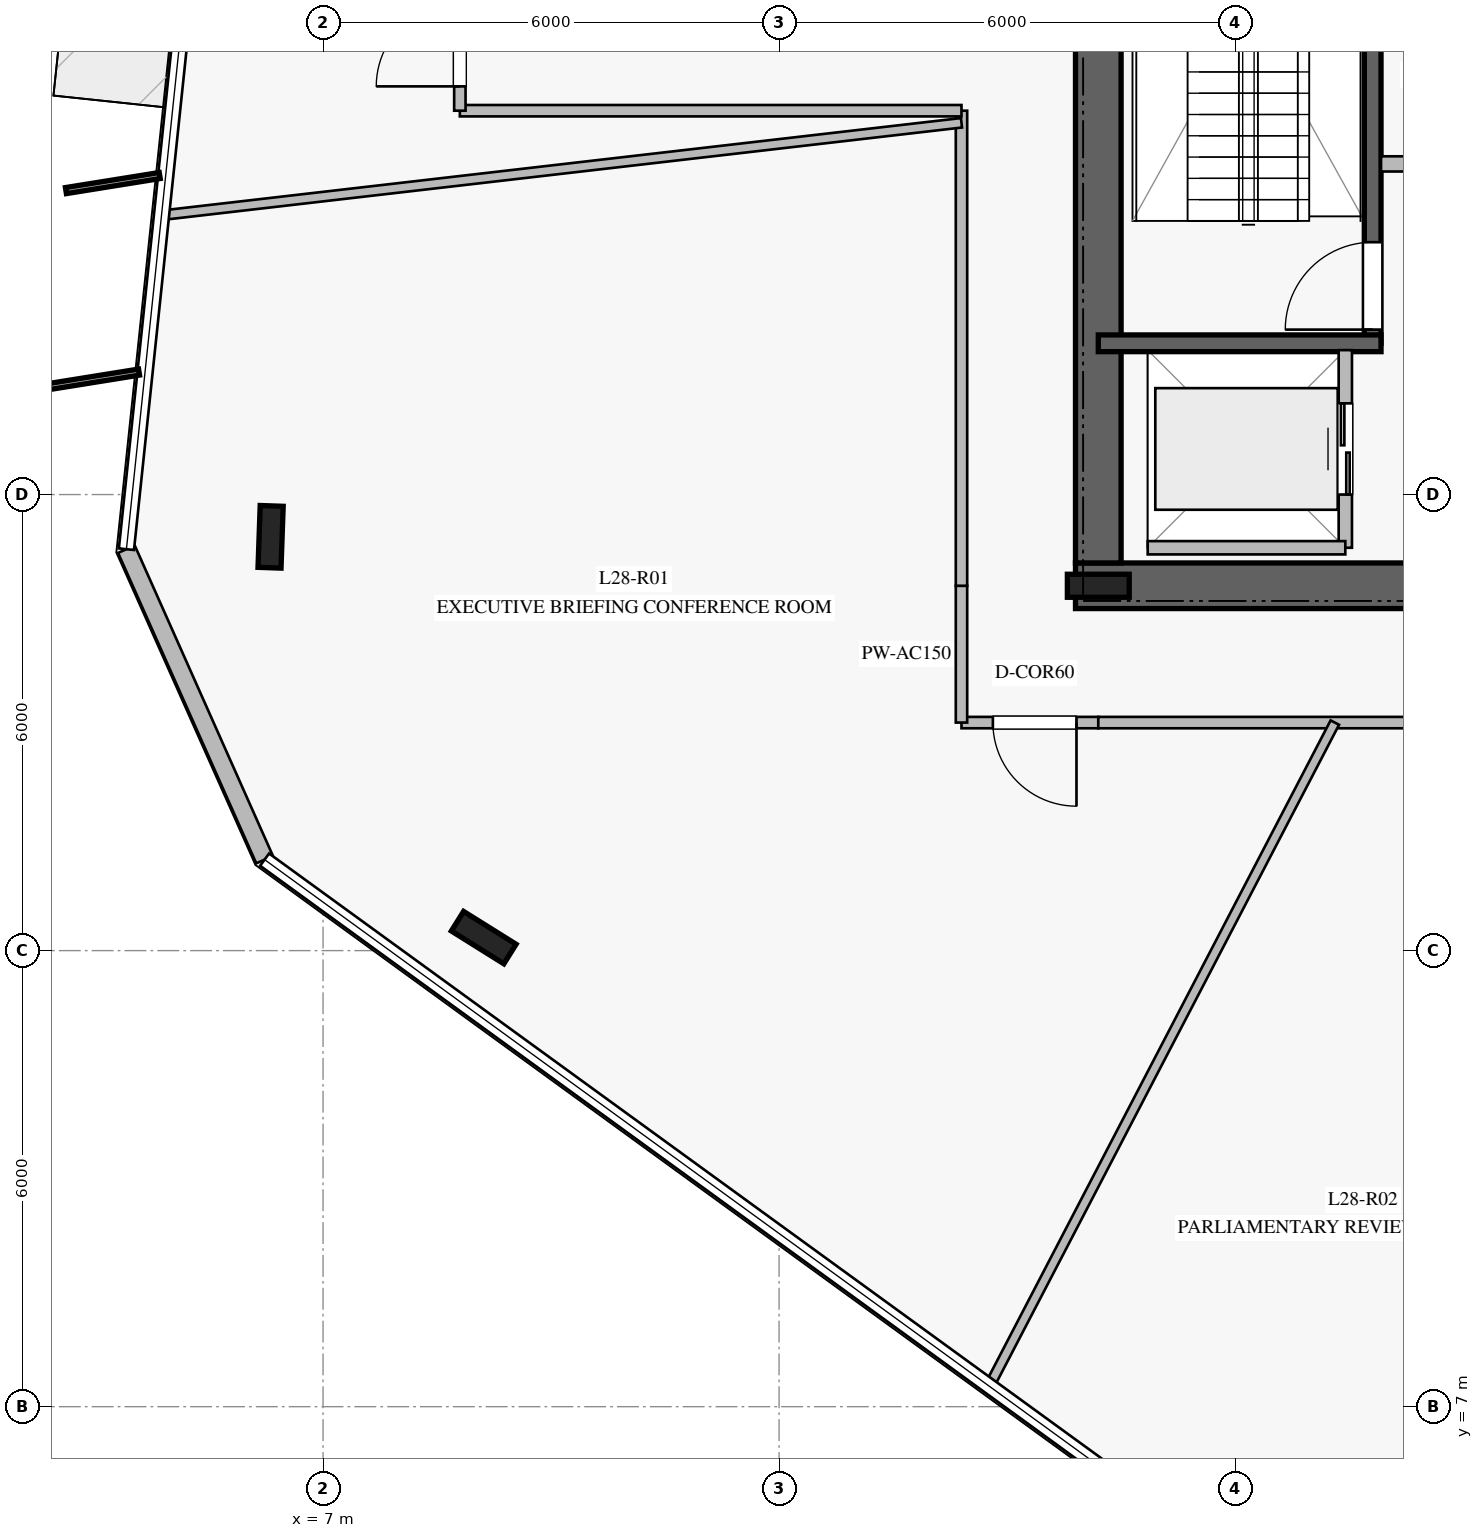
"""IFC4 building model, lengths in metres.
Left out: names, types, materials, properties, quantities, classifications, styles, units other than length and angle.
Written with IfcOpenShell. Run it as: python <this file> out.ifc"""

import sys

from ifc_helpers import new_model, si_unit, direction, frame, frame_2d, origin, origin_2d, place, context, subcontext, project, spatial, rectangle, i_section, extrude, element, fill, save


model = new_model("IFC4")
c1 = context("Model", 3, precision=1e-05, world=origin(), true_north=direction((0.0, 1.0)))
c2 = subcontext(c1, "Body", "Model", "MODEL_VIEW")
j1 = project(units=[si_unit("LENGTHUNIT", "METRE"), si_unit("PLANEANGLEUNIT", "RADIAN")], contexts=[c1])
p1 = place(None, origin())
s1 = spatial("IfcSite", under=j1, at=p1, CompositionType="ELEMENT")
p2 = place(p1, origin())
s2 = spatial("IfcBuilding", under=s1, at=p2, CompositionType="ELEMENT")
p3 = place(p2, frame((0.0, 0.0, 118.4)))
s3 = spatial("IfcBuildingStorey", under=s2, at=p3, CompositionType="ELEMENT", Elevation=118.4)
p4 = place(p3, frame((16.9, 17.8, 0.0), z_axis=(0.0, 0.0, 1.0), x_axis=(1.0, 0.0, 0.0)))
e1 = element("IfcWall", 1, at=p4, inside=s3, PredefinedType="SHEAR", context=c2, shape_type="SweptSolid", body=[
    extrude(rectangle(XDim=16.2, YDim=0.6, at=frame_2d((8.1, 0.0))), origin(), (0.0, 0.0, 1.0), 3.76),
])
p5 = place(p4, frame((5.05, 0.0, 0.0)))
e2 = element("IfcOpeningElement", 2, at=p5, cuts=e1, PredefinedType="OPENING", context=c2, shape_type="SweptSolid", body=[
    extrude(rectangle(XDim=1.2, YDim=2.25, at=frame_2d((0.6, 1.125))), frame((0.0, 0.31, 0.0), z_axis=(0.0, -1.0, 0.0), x_axis=(1.0, 0.0, 0.0)), (0.0, 0.0, 1.0), 0.62),
])
p6 = place(p4, frame((10.95, 0.0, 0.0)))
e3 = element("IfcOpeningElement", 3, at=p6, cuts=e1, PredefinedType="OPENING", context=c2, shape_type="SweptSolid", body=[
    extrude(rectangle(XDim=1.1, YDim=2.2, at=frame_2d((0.55, 1.1))), frame((0.0, 0.31, 0.0), z_axis=(0.0, -1.0, 0.0), x_axis=(1.0, 0.0, 0.0)), (0.0, 0.0, 1.0), 0.62),
])
p7 = place(p3, frame((17.2, 31.9, 0.0), z_axis=(0.0, 0.0, 1.0), x_axis=(0.0, -1.0, 0.0)))
e4 = element("IfcWall", 4, at=p7, inside=s3, PredefinedType="SHEAR", context=c2, shape_type="SweptSolid", body=[
    extrude(rectangle(XDim=13.8, YDim=0.6, at=frame_2d((6.9, 0.0))), origin(), (0.0, 0.0, 1.0), 3.76),
])
p8 = place(p7, frame((2.05, 0.0, 0.0)))
e5 = element("IfcOpeningElement", 5, at=p8, cuts=e4, PredefinedType="OPENING", context=c2, shape_type="SweptSolid", body=[
    extrude(rectangle(XDim=1.5, YDim=2.2, at=frame_2d((0.75, 1.1))), frame((0.0, 0.31, 0.0), z_axis=(0.0, -1.0, 0.0), x_axis=(1.0, 0.0, 0.0)), (0.0, 0.0, 1.0), 0.62),
])
p9 = place(p3, frame((17.2, 17.8, 0.0), z_axis=(0.0, 0.0, 1.0), x_axis=(1.0, 0.0, 0.0)))
e6 = element("IfcColumn", 6, at=p9, inside=s3, PredefinedType="COLUMN", context=c2, shape_type="SweptSolid", body=[
    extrude(i_section(OverallWidth=0.303, OverallDepth=0.814, WebThickness=0.021, FlangeThickness=0.04, at=origin_2d()), origin(), (0.0, 0.0, 1.0), 4.0),
])
p10 = place(p3, frame((20.81, 20.99, 0.0), z_axis=(0.0, 0.0, 1.0), x_axis=(0.0, 1.0, 0.0)))
e7 = element("IfcWall", 7, at=p10, inside=s3, PredefinedType="SOLIDWALL", context=c2, shape_type="SweptSolid", body=[
    extrude(rectangle(XDim=7.22, YDim=0.22, at=frame_2d((3.61, 0.0))), origin(), (0.0, 0.0, 1.0), 3.76),
])
p11 = place(p10, frame((0.18, 0.0, 0.0)))
e8 = element("IfcOpeningElement", 8, at=p11, cuts=e7, PredefinedType="OPENING", context=c2, shape_type="SweptSolid", body=[
    extrude(rectangle(XDim=1.15, YDim=2.2, at=frame_2d((0.575, 1.1))), frame((0.0, 0.12, 0.0), z_axis=(0.0, -1.0, 0.0), x_axis=(1.0, 0.0, 0.0)), (0.0, 0.0, 1.0), 0.24),
])
p12 = place(p3, frame((17.2, 20.99, 0.0), z_axis=(0.0, 0.0, 1.0), x_axis=(1.0, 0.0, 0.0)))
e9 = element("IfcWall", 9, at=p12, inside=s3, PredefinedType="SOLIDWALL", context=c2, shape_type="SweptSolid", body=[
    extrude(rectangle(XDim=3.72, YDim=0.22, at=frame_2d((1.86, 0.0))), origin(), (0.0, 0.0, 1.0), 3.76),
])
for number, where, z_axis, x_axis in (
    (10, (6.31, 18.444, 0.0), (0.0, 0.0, 1.0), (0.035, 0.999, 0.0)),
    (11, (9.114, 13.171, 0.0), (0.0, 0.0, 1.0), (-0.848, 0.53, 0.0)),
):
    element("IfcColumn", number, at=place(p3, frame(where, z_axis=z_axis, x_axis=x_axis)), inside=s3, PredefinedType="COLUMN", context=c2, shape_type="SweptSolid", body=[
        extrude(i_section(OverallWidth=0.303, OverallDepth=0.814, WebThickness=0.021, FlangeThickness=0.04, at=origin_2d()), origin(), (0.0, 0.0, 1.0), 4.0),
    ])
p13 = place(p3, frame((4.413, 18.281, 0.0), z_axis=(0.0, 0.0, 1.0), x_axis=(0.406655262741, -0.913581686159, 0.0)))
e12 = element("IfcWall", 12, at=p13, inside=s3, PredefinedType="STANDARD", context=c2, shape_type="SweptSolid", body=[
    extrude(rectangle(XDim=4.47, YDim=0.24, at=frame_2d((2.235, 0.0))), origin(), (0.0, 0.0, 1.0), 3.76),
])
p14 = place(p3, frame((20.92, 23.35, 0.0), z_axis=(0.0, 0.0, 1.0), x_axis=(1.0, 0.0, 0.0)))
e13 = element("IfcWall", 13, at=p14, inside=s3, PredefinedType="PARTITIONING", context=c2, shape_type="SweptSolid", body=[
    extrude(rectangle(XDim=3.38, YDim=0.2, at=frame_2d((1.69, 0.0))), origin(), (0.0, 0.0, 1.0), 3.76),
])
p15 = place(p3, frame((20.45, 18.3, 0.0), z_axis=(0.0, 0.0, 1.0), x_axis=(0.0, 1.0, 0.0)))
e14 = element("IfcWall", 14, at=p15, inside=s3, PredefinedType="PARTITIONING", context=c2, shape_type="SweptSolid", body=[
    extrude(rectangle(XDim=2.6, YDim=0.175, at=frame_2d((1.3, 0.0))), origin(), (0.0, 0.0, 1.0), 3.76),
])
p16 = place(p15, frame((0.7, 0.0, 0.0)))
e15 = element("IfcOpeningElement", 15, at=p16, cuts=e14, PredefinedType="OPENING", context=c2, shape_type="SweptSolid", body=[
    extrude(rectangle(XDim=1.2, YDim=2.2, at=frame_2d((0.6, 1.1))), frame((0.0, 0.098, 0.0), z_axis=(0.0, -1.0, 0.0), x_axis=(1.0, 0.0, 0.0)), (0.0, 0.0, 1.0), 0.195),
])
p17 = place(p3, frame((17.85, 18.3, 0.0), z_axis=(0.0, 0.0, 1.0), x_axis=(1.0, 0.0, 0.0)))
e16 = element("IfcWall", 16, at=p17, inside=s3, PredefinedType="PARTITIONING", context=c2, shape_type="SweptSolid", body=[
    extrude(rectangle(XDim=2.6, YDim=0.175, at=frame_2d((1.3, 0.0))), origin(), (0.0, 0.0, 1.0), 3.76),
])
p18 = place(p3, frame((17.2, 16.0, 0.0), z_axis=(0.0, 0.0, 1.0), x_axis=(-1.0, 0.0, 0.0)))
e17 = element("IfcWall", 17, at=p18, inside=s3, PredefinedType="PARTITIONING", context=c2, shape_type="SweptSolid", body=[
    extrude(rectangle(XDim=1.8, YDim=0.15, at=frame_2d((0.9, 0.0))), origin(), (0.0, 0.0, 1.0), 3.36),
])
p19 = place(p18, frame((0.287, 0.0, 0.0)))
e18 = element("IfcOpeningElement", 18, at=p19, cuts=e17, PredefinedType="OPENING", context=c2, shape_type="SweptSolid", body=[
    extrude(rectangle(XDim=1.1, YDim=2.2, at=frame_2d((0.55, 1.1))), frame((0.0, 0.085, 0.0), z_axis=(0.0, -1.0, 0.0), x_axis=(1.0, 0.0, 0.0)), (0.0, 0.0, 1.0), 0.17),
])
p20 = place(p3, frame((15.4, 16.0, 0.0), z_axis=(0.0, 0.0, 1.0), x_axis=(0.0, 1.0, 0.0)))
e19 = element("IfcWall", 19, at=p20, inside=s3, PredefinedType="PARTITIONING", context=c2, shape_type="SweptSolid", body=[
    extrude(rectangle(XDim=1.8, YDim=0.15, at=frame_2d((0.9, 0.0))), origin(), (0.0, 0.0, 1.0), 3.21),
])
p21 = place(p3, frame((15.4, 17.8, 0.0), z_axis=(0.0, 0.0, 1.0), x_axis=(0.0, 1.0, 0.0)))
e20 = element("IfcWall", 20, at=p21, inside=s3, PredefinedType="PARTITIONING", context=c2, shape_type="SweptSolid", body=[
    extrude(rectangle(XDim=6.25, YDim=0.15, at=frame_2d((3.125, 0.0))), origin(), (0.0, 0.0, 1.0), 3.21),
])
p22 = place(p3, frame((15.4, 24.05, 0.0), z_axis=(0.0, 0.0, 1.0), x_axis=(-1.0, 0.0, 0.0)))
e21 = element("IfcWall", 21, at=p22, inside=s3, PredefinedType="PARTITIONING", context=c2, shape_type="SweptSolid", body=[
    extrude(rectangle(XDim=6.6, YDim=0.15, at=frame_2d((3.3, 0.0))), origin(), (0.0, 0.0, 1.0), 3.36),
])
p23 = place(p3, frame((8.8, 24.05, 0.0), z_axis=(0.0, 0.0, 1.0), x_axis=(0.0, 1.0, 0.0)))
e22 = element("IfcWall", 22, at=p23, inside=s3, PredefinedType="PARTITIONING", context=c2, shape_type="SweptSolid", body=[
    extrude(rectangle(XDim=1.9, YDim=0.15, at=frame_2d((0.95, 0.0))), origin(), (0.0, 0.0, 1.0), 3.76),
])
p24 = place(p23, frame((0.32, 0.0, 0.0)))
e23 = element("IfcOpeningElement", 23, at=p24, cuts=e22, PredefinedType="OPENING", context=c2, shape_type="SweptSolid", body=[
    extrude(rectangle(XDim=1.1, YDim=2.2, at=frame_2d((0.55, 1.1))), frame((0.0, 0.085, 0.0), z_axis=(0.0, -1.0, 0.0), x_axis=(1.0, 0.0, 0.0)), (0.0, 0.0, 1.0), 0.17),
])
p25 = place(p3, frame((24.05, 16.0, 0.0), z_axis=(0.0, 0.0, 1.0), x_axis=(-1.0, 0.0, 0.0)))
e24 = element("IfcWall", 24, at=p25, inside=s3, PredefinedType="PARTITIONING", context=c2, shape_type="SweptSolid", body=[
    extrude(rectangle(XDim=6.85, YDim=0.15, at=frame_2d((3.425, 0.0))), origin(), (0.0, 0.0, 1.0), 3.21),
])
p26 = place(p3, frame((15.4, 23.891, 0.0), z_axis=(0.0, 0.0, 1.0), x_axis=(-0.993380400017, -0.114871148952, 0.0)))
e25 = element("IfcWall", 25, at=p26, inside=s3, PredefinedType="PARTITIONING", context=c2, shape_type="SweptSolid", body=[
    extrude(rectangle(XDim=10.578, YDim=0.125, at=frame_2d((5.289, 0.0))), origin(), (0.0, 0.0, 1.0), 3.16),
])
p27 = place(p3, frame((20.312, 16.0, 0.0), z_axis=(0.0, 0.0, 1.0), x_axis=(-0.46193075433, -0.886915992755, 0.0)))
e26 = element("IfcWall", 26, at=p27, inside=s3, PredefinedType="PARTITIONING", context=c2, shape_type="SweptSolid", body=[
    extrude(rectangle(XDim=9.826, YDim=0.125, at=frame_2d((4.913, 0.0))), origin(), (0.0, 0.0, 1.0), 3.05),
])
p28 = place(p11, origin())
e27 = element("IfcDoor", 27, at=p28, inside=s3, OperationType="SINGLE_SWING_LEFT", PredefinedType="DOOR", context=c2, shape_type="SweptSolid", body=[
    extrude(rectangle(XDim=1.15, YDim=2.2, at=frame_2d((0.575, 1.1))), frame((0.0, 0.025, 0.0), z_axis=(0.0, -1.0, 0.0), x_axis=(1.0, 0.0, 0.0)), (0.0, 0.0, 1.0), 0.05),
])
fill(e8, e27)
p29 = place(p16, origin())
e28 = element("IfcDoor", 28, at=p29, inside=s3, OperationType="DOUBLE_DOOR_SLIDING", PredefinedType="DOOR", context=c2, shape_type="SweptSolid", body=[
    extrude(rectangle(XDim=1.2, YDim=2.2, at=frame_2d((0.6, 1.1))), frame((0.0, 0.025, 0.0), z_axis=(0.0, -1.0, 0.0), x_axis=(1.0, 0.0, 0.0)), (0.0, 0.0, 1.0), 0.05),
])
fill(e15, e28)
p30 = place(p19, origin())
e29 = element("IfcDoor", 29, at=p30, inside=s3, OperationType="SINGLE_SWING_LEFT", PredefinedType="DOOR", context=c2, shape_type="SweptSolid", body=[
    extrude(rectangle(XDim=1.1, YDim=2.2, at=frame_2d((0.55, 1.1))), frame((0.0, 0.025, 0.0), z_axis=(0.0, -1.0, 0.0), x_axis=(1.0, 0.0, 0.0)), (0.0, 0.0, 1.0), 0.05),
])
fill(e18, e29)
p31 = place(p24, origin())
e30 = element("IfcDoor", 30, at=p31, inside=s3, OperationType="SINGLE_SWING_LEFT", PredefinedType="DOOR", context=c2, shape_type="SweptSolid", body=[
    extrude(rectangle(XDim=1.1, YDim=2.2, at=frame_2d((0.55, 1.1))), frame((0.0, 0.025, 0.0), z_axis=(0.0, -1.0, 0.0), x_axis=(1.0, 0.0, 0.0)), (0.0, 0.0, 1.0), 0.05),
])
fill(e23, e30)
save(model, sys.argv[1])
